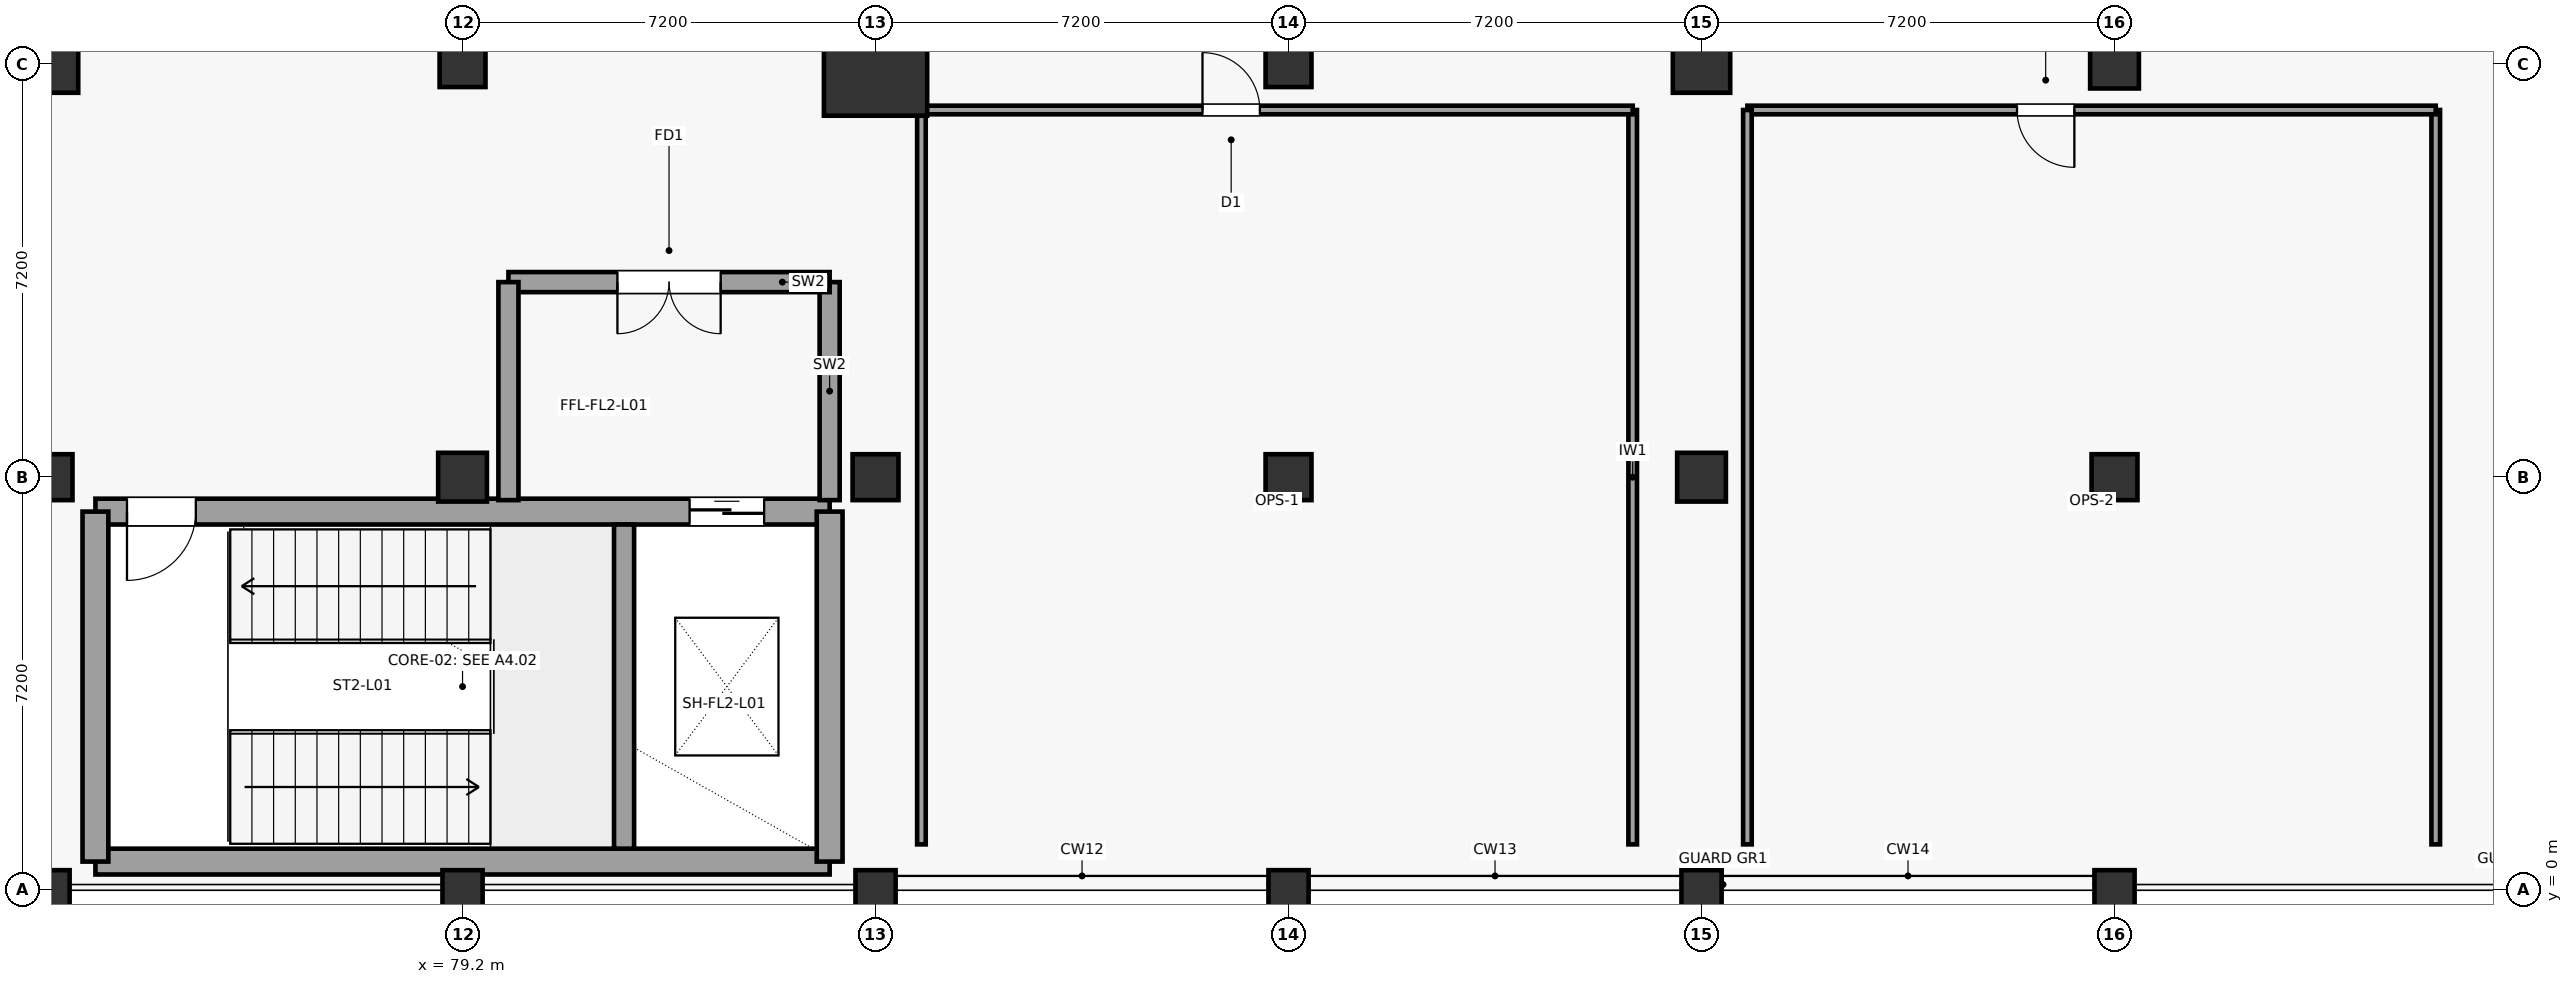
"""IFC4 building model, lengths in metres.
Left out: names, types, materials, properties, quantities, classifications, styles, units other than length and angle.
Written with IfcOpenShell. Run it as: python <this file> out.ifc"""

import sys

from ifc_helpers import new_model, si_unit, direction, frame, frame_2d, origin, origin_2d, place, context, subcontext, project, spatial, rectangle, circle, extrude, element, fill, save


model = new_model("IFC4")
c1 = context("Model", 3, precision=1e-05, world=origin(), true_north=direction((0.0, 1.0)))
c2 = subcontext(c1, "Body", "Model", "MODEL_VIEW")
j1 = project(units=[si_unit("LENGTHUNIT", "METRE"), si_unit("PLANEANGLEUNIT", "RADIAN")], contexts=[c1])
p1 = place(None, origin())
s1 = spatial("IfcSite", under=j1, at=p1, CompositionType="ELEMENT")
p2 = place(p1, origin())
s2 = spatial("IfcBuilding", under=s1, at=p2, CompositionType="ELEMENT")
p3 = place(p2, frame((0.0, 0.0, 5.4)))
s3 = spatial("IfcBuildingStorey", under=s2, at=p3, CompositionType="ELEMENT", Elevation=5.4)
p4 = place(p3, frame((72.0, 0.0, 0.0), z_axis=(0.0, 0.0, 1.0), x_axis=(1.0, 0.0, 0.0)))
e1 = element("IfcColumn", 1, at=p4, inside=s3, PredefinedType="COLUMN", context=c2, shape_type="SweptSolid", body=[
    extrude(rectangle(XDim=0.7, YDim=0.7, at=origin_2d()), origin(), (0.0, 0.0, 1.0), 4.2),
])
p5 = place(p3, frame((72.0, 7.2, 0.0), z_axis=(0.0, 0.0, 1.0), x_axis=(1.0, 0.0, 0.0)))
e2 = element("IfcColumn", 2, at=p5, inside=s3, PredefinedType="COLUMN", context=c2, shape_type="SweptSolid", body=[
    extrude(rectangle(XDim=0.8, YDim=0.8, at=origin_2d()), origin(), (0.0, 0.0, 1.0), 4.2),
])
p6 = place(p3, frame((72.0, 14.4, 0.0), z_axis=(0.0, 0.0, 1.0), x_axis=(1.0, 0.0, 0.0)))
e3 = element("IfcColumn", 3, at=p6, inside=s3, PredefinedType="COLUMN", context=c2, shape_type="SweptSolid", body=[
    extrude(circle(Radius=0.5, at=origin_2d()), origin(), (0.0, 0.0, 1.0), 4.2),
])
p7 = place(p3, frame((79.2, 0.0, 0.0), z_axis=(0.0, 0.0, 1.0), x_axis=(1.0, 0.0, 0.0)))
e4 = element("IfcColumn", 4, at=p7, inside=s3, PredefinedType="COLUMN", context=c2, shape_type="SweptSolid", body=[
    extrude(rectangle(XDim=0.7, YDim=0.7, at=origin_2d()), origin(), (0.0, 0.0, 1.0), 4.2),
])
p8 = place(p3, frame((79.2, 7.2, 0.0), z_axis=(0.0, 0.0, 1.0), x_axis=(1.0, 0.0, 0.0)))
e5 = element("IfcColumn", 5, at=p8, inside=s3, PredefinedType="COLUMN", context=c2, shape_type="SweptSolid", body=[
    extrude(rectangle(XDim=0.85, YDim=0.85, at=origin_2d()), origin(), (0.0, 0.0, 1.0), 4.2),
])
p9 = place(p3, frame((79.2, 14.4, 0.0), z_axis=(0.0, 0.0, 1.0), x_axis=(1.0, 0.0, 0.0)))
e6 = element("IfcColumn", 6, at=p9, inside=s3, PredefinedType="COLUMN", context=c2, shape_type="SweptSolid", body=[
    extrude(rectangle(XDim=0.8, YDim=0.8, at=origin_2d()), origin(), (0.0, 0.0, 1.0), 4.2),
])
p10 = place(p3, frame((86.4, 0.0, 0.0), z_axis=(0.0, 0.0, 1.0), x_axis=(1.0, 0.0, 0.0)))
e7 = element("IfcColumn", 7, at=p10, inside=s3, PredefinedType="COLUMN", context=c2, shape_type="SweptSolid", body=[
    extrude(rectangle(XDim=0.7, YDim=0.7, at=origin_2d()), origin(), (0.0, 0.0, 1.0), 4.2),
])
p11 = place(p3, frame((86.4, 7.2, 0.0), z_axis=(0.0, 0.0, 1.0), x_axis=(1.0, 0.0, 0.0)))
e8 = element("IfcColumn", 8, at=p11, inside=s3, PredefinedType="COLUMN", context=c2, shape_type="SweptSolid", body=[
    extrude(circle(Radius=0.4, at=origin_2d()), origin(), (0.0, 0.0, 1.0), 4.2),
])
p12 = place(p3, frame((86.4, 14.4, 0.0), z_axis=(0.0, 0.0, 1.0), x_axis=(1.0, 0.0, 0.0)))
e9 = element("IfcColumn", 9, at=p12, inside=s3, PredefinedType="COLUMN", context=c2, shape_type="SweptSolid", body=[
    extrude(circle(Radius=0.9, at=origin_2d()), origin(), (0.0, 0.0, 1.0), 4.2),
])
p13 = place(p3, frame((93.6, 0.0, 0.0), z_axis=(0.0, 0.0, 1.0), x_axis=(1.0, 0.0, 0.0)))
e10 = element("IfcColumn", 10, at=p13, inside=s3, PredefinedType="COLUMN", context=c2, shape_type="SweptSolid", body=[
    extrude(rectangle(XDim=0.7, YDim=0.7, at=origin_2d()), origin(), (0.0, 0.0, 1.0), 4.2),
])
p14 = place(p3, frame((93.6, 7.2, 0.0), z_axis=(0.0, 0.0, 1.0), x_axis=(1.0, 0.0, 0.0)))
e11 = element("IfcColumn", 11, at=p14, inside=s3, PredefinedType="COLUMN", context=c2, shape_type="SweptSolid", body=[
    extrude(rectangle(XDim=0.8, YDim=0.8, at=origin_2d()), origin(), (0.0, 0.0, 1.0), 4.2),
])
p15 = place(p3, frame((93.6, 14.4, 0.0), z_axis=(0.0, 0.0, 1.0), x_axis=(1.0, 0.0, 0.0)))
e12 = element("IfcColumn", 12, at=p15, inside=s3, PredefinedType="COLUMN", context=c2, shape_type="SweptSolid", body=[
    extrude(circle(Radius=0.4, at=origin_2d()), origin(), (0.0, 0.0, 1.0), 4.2),
])
p16 = place(p3, frame((100.8, 0.0, 0.0), z_axis=(0.0, 0.0, 1.0), x_axis=(1.0, 0.0, 0.0)))
e13 = element("IfcColumn", 13, at=p16, inside=s3, PredefinedType="COLUMN", context=c2, shape_type="SweptSolid", body=[
    extrude(rectangle(XDim=0.7, YDim=0.7, at=origin_2d()), origin(), (0.0, 0.0, 1.0), 4.2),
])
p17 = place(p3, frame((100.8, 7.2, 0.0), z_axis=(0.0, 0.0, 1.0), x_axis=(1.0, 0.0, 0.0)))
e14 = element("IfcColumn", 14, at=p17, inside=s3, PredefinedType="COLUMN", context=c2, shape_type="SweptSolid", body=[
    extrude(rectangle(XDim=0.85, YDim=0.85, at=origin_2d()), origin(), (0.0, 0.0, 1.0), 4.2),
])
p18 = place(p3, frame((100.8, 14.4, 0.0), z_axis=(0.0, 0.0, 1.0), x_axis=(1.0, 0.0, 0.0)))
e15 = element("IfcColumn", 15, at=p18, inside=s3, PredefinedType="COLUMN", context=c2, shape_type="SweptSolid", body=[
    extrude(circle(Radius=0.5, at=origin_2d()), origin(), (0.0, 0.0, 1.0), 4.2),
])
p19 = place(p3, frame((108.0, 0.0, 0.0), z_axis=(0.0, 0.0, 1.0), x_axis=(1.0, 0.0, 0.0)))
e16 = element("IfcColumn", 16, at=p19, inside=s3, PredefinedType="COLUMN", context=c2, shape_type="SweptSolid", body=[
    extrude(rectangle(XDim=0.7, YDim=0.7, at=origin_2d()), origin(), (0.0, 0.0, 1.0), 4.2),
])
p20 = place(p3, frame((108.0, 7.2, 0.0), z_axis=(0.0, 0.0, 1.0), x_axis=(1.0, 0.0, 0.0)))
e17 = element("IfcColumn", 17, at=p20, inside=s3, PredefinedType="COLUMN", context=c2, shape_type="SweptSolid", body=[
    extrude(circle(Radius=0.4, at=origin_2d()), origin(), (0.0, 0.0, 1.0), 4.2),
])
p21 = place(p3, frame((108.0, 14.4, 0.0), z_axis=(0.0, 0.0, 1.0), x_axis=(1.0, 0.0, 0.0)))
e18 = element("IfcColumn", 18, at=p21, inside=s3, PredefinedType="COLUMN", context=c2, shape_type="SweptSolid", body=[
    extrude(rectangle(XDim=0.85, YDim=0.85, at=origin_2d()), origin(), (0.0, 0.0, 1.0), 4.2),
])
p22 = place(p3, frame((72.8, 0.5, 0.0), z_axis=(0.0, 0.0, 1.0), x_axis=(1.0, 0.0, 0.0)))
e19 = element("IfcWall", 19, at=p22, inside=s3, PredefinedType="SHEAR", context=c2, shape_type="SweptSolid", body=[
    extrude(rectangle(XDim=12.8, YDim=0.45, at=frame_2d((6.4, 0.0))), origin(), (0.0, 0.0, 1.0), 3.92),
])
p23 = place(p3, frame((72.8, 6.6, 0.0), z_axis=(0.0, 0.0, 1.0), x_axis=(1.0, 0.0, 0.0)))
e20 = element("IfcWall", 20, at=p23, inside=s3, PredefinedType="SHEAR", context=c2, shape_type="SweptSolid", body=[
    extrude(rectangle(XDim=12.8, YDim=0.45, at=frame_2d((6.4, 0.0))), origin(), (0.0, 0.0, 1.0), 3.92),
])
p24 = place(p23, frame((0.55, 0.0, 0.0)))
e21 = element("IfcOpeningElement", 21, at=p24, cuts=e20, PredefinedType="OPENING", context=c2, shape_type="SweptSolid", body=[
    extrude(rectangle(XDim=1.2, YDim=2.25, at=frame_2d((0.6, 1.125))), frame((0.0, 0.235, 0.0), z_axis=(0.0, -1.0, 0.0), x_axis=(1.0, 0.0, 0.0)), (0.0, 0.0, 1.0), 0.47),
])
p25 = place(p23, frame((10.358, 0.0, 0.0)))
e22 = element("IfcOpeningElement", 22, at=p25, cuts=e20, PredefinedType="OPENING", context=c2, shape_type="SweptSolid", body=[
    extrude(rectangle(XDim=1.3, YDim=2.25, at=frame_2d((0.65, 1.125))), frame((0.0, 0.235, 0.0), z_axis=(0.0, -1.0, 0.0), x_axis=(1.0, 0.0, 0.0)), (0.0, 0.0, 1.0), 0.47),
])
for number, where, z_axis, x_axis in (
    (23, (72.8, 0.5, 0.0), (0.0, 0.0, 1.0), (0.0, 1.0, 0.0)),
    (24, (85.6, 0.5, 0.0), (0.0, 0.0, 1.0), (0.0, 1.0, 0.0)),
):
    element("IfcWall", number, at=place(p3, frame(where, z_axis=z_axis, x_axis=x_axis)), inside=s3, PredefinedType="SHEAR", context=c2, shape_type="SweptSolid", body=[
        extrude(rectangle(XDim=6.1, YDim=0.45, at=frame_2d((3.05, 0.0))), origin(), (0.0, 0.0, 1.0), 3.92),
    ])
p26 = place(p3, frame((82.016, 0.725, 0.0), z_axis=(0.0, 0.0, 1.0), x_axis=(0.0, 1.0, 0.0)))
e25 = element("IfcWall", 25, at=p26, inside=s3, PredefinedType="SHEAR", context=c2, shape_type="SweptSolid", body=[
    extrude(rectangle(XDim=5.65, YDim=0.35, at=frame_2d((2.825, 0.0))), origin(), (0.0, 0.0, 1.0), 3.92),
])
p27 = place(p3, frame((85.6, 6.8, 0.0), z_axis=(0.0, 0.0, 1.0), x_axis=(0.0, 1.0, 0.0)))
e26 = element("IfcWall", 26, at=p27, inside=s3, PredefinedType="SHEAR", context=c2, shape_type="SweptSolid", body=[
    extrude(rectangle(XDim=3.8, YDim=0.35, at=frame_2d((1.9, 0.0))), origin(), (0.0, 0.0, 1.0), 2.98),
])
p28 = place(p3, frame((85.6, 10.6, 0.0), z_axis=(0.0, 0.0, 1.0), x_axis=(-1.0, 0.0, 0.0)))
e27 = element("IfcWall", 27, at=p28, inside=s3, PredefinedType="SHEAR", context=c2, shape_type="SweptSolid", body=[
    extrude(rectangle(XDim=5.6, YDim=0.35, at=frame_2d((2.8, 0.0))), origin(), (0.0, 0.0, 1.0), 2.98),
])
p29 = place(p28, frame((1.9, 0.0, 0.0)))
e28 = element("IfcOpeningElement", 28, at=p29, cuts=e27, PredefinedType="OPENING", context=c2, shape_type="SweptSolid", body=[
    extrude(rectangle(XDim=1.8, YDim=2.3, at=frame_2d((0.9, 1.15))), frame((0.0, 0.185, 0.0), z_axis=(0.0, -1.0, 0.0), x_axis=(1.0, 0.0, 0.0)), (0.0, 0.0, 1.0), 0.37),
])
p30 = place(p3, frame((80.0, 10.6, 0.0), z_axis=(0.0, 0.0, 1.0), x_axis=(0.0, -1.0, 0.0)))
e29 = element("IfcWall", 29, at=p30, inside=s3, PredefinedType="SHEAR", context=c2, shape_type="SweptSolid", body=[
    extrude(rectangle(XDim=3.8, YDim=0.35, at=frame_2d((1.9, 0.0))), origin(), (0.0, 0.0, 1.0), 2.98),
])
p31 = place(p3, frame((99.6, 0.8, 0.0), z_axis=(0.0, 0.0, 1.0), x_axis=(0.0, 1.0, 0.0)))
e30 = element("IfcWall", 30, at=p31, inside=s3, PredefinedType="PARTITIONING", context=c2, shape_type="SweptSolid", body=[
    extrude(rectangle(XDim=12.8, YDim=0.15, at=frame_2d((6.4, 0.0))), origin(), (0.0, 0.0, 1.0), 2.98),
])
p32 = place(p3, frame((99.6, 13.6, 0.0), z_axis=(0.0, 0.0, 1.0), x_axis=(-1.0, 0.0, 0.0)))
e31 = element("IfcWall", 31, at=p32, inside=s3, PredefinedType="PARTITIONING", context=c2, shape_type="SweptSolid", body=[
    extrude(rectangle(XDim=12.4, YDim=0.15, at=frame_2d((6.2, 0.0))), origin(), (0.0, 0.0, 1.0), 2.98),
])
p33 = place(p32, frame((6.5, 0.0, 0.0)))
e32 = element("IfcOpeningElement", 32, at=p33, cuts=e31, PredefinedType="OPENING", context=c2, shape_type="SweptSolid", body=[
    extrude(rectangle(XDim=1.0, YDim=2.2, at=frame_2d((0.5, 1.1))), frame((0.0, 0.085, 0.0), z_axis=(0.0, -1.0, 0.0), x_axis=(1.0, 0.0, 0.0)), (0.0, 0.0, 1.0), 0.17),
])
for number, where, z_axis, x_axis in (
    (33, (87.2, 13.6, 0.0), (0.0, 0.0, 1.0), (0.0, -1.0, 0.0)),
    (34, (113.6, 0.8, 0.0), (0.0, 0.0, 1.0), (0.0, 1.0, 0.0)),
):
    element("IfcWall", number, at=place(p3, frame(where, z_axis=z_axis, x_axis=x_axis)), inside=s3, PredefinedType="PARTITIONING", context=c2, shape_type="SweptSolid", body=[
        extrude(rectangle(XDim=12.8, YDim=0.15, at=frame_2d((6.4, 0.0))), origin(), (0.0, 0.0, 1.0), 2.98),
    ])
p34 = place(p3, frame((113.6, 13.6, 0.0), z_axis=(0.0, 0.0, 1.0), x_axis=(-1.0, 0.0, 0.0)))
e35 = element("IfcWall", 35, at=p34, inside=s3, PredefinedType="PARTITIONING", context=c2, shape_type="SweptSolid", body=[
    extrude(rectangle(XDim=12.0, YDim=0.15, at=frame_2d((6.0, 0.0))), origin(), (0.0, 0.0, 1.0), 2.98),
])
p35 = place(p34, frame((6.3, 0.0, 0.0)))
e36 = element("IfcOpeningElement", 36, at=p35, cuts=e35, PredefinedType="OPENING", context=c2, shape_type="SweptSolid", body=[
    extrude(rectangle(XDim=1.0, YDim=2.2, at=frame_2d((0.5, 1.1))), frame((0.0, 0.085, 0.0), z_axis=(0.0, -1.0, 0.0), x_axis=(1.0, 0.0, 0.0)), (0.0, 0.0, 1.0), 0.17),
])
p36 = place(p3, frame((101.6, 13.6, 0.0), z_axis=(0.0, 0.0, 1.0), x_axis=(0.0, -1.0, 0.0)))
e37 = element("IfcWall", 37, at=p36, inside=s3, PredefinedType="PARTITIONING", context=c2, shape_type="SweptSolid", body=[
    extrude(rectangle(XDim=12.8, YDim=0.15, at=frame_2d((6.4, 0.0))), origin(), (0.0, 0.0, 1.0), 2.98),
])
p37 = place(p24, frame((1.2, 0.0, 0.0), z_axis=(0.0, 0.0, 1.0), x_axis=(-1.0, 0.0, 0.0)))
e38 = element("IfcDoor", 38, at=p37, inside=s3, OperationType="SINGLE_SWING_LEFT", PredefinedType="DOOR", context=c2, shape_type="SweptSolid", body=[
    extrude(rectangle(XDim=1.2, YDim=2.25, at=frame_2d((0.6, 1.125))), frame((0.0, 0.025, 0.0), z_axis=(0.0, -1.0, 0.0), x_axis=(1.0, 0.0, 0.0)), (0.0, 0.0, 1.0), 0.05),
])
fill(e21, e38)
p38 = place(p25, origin())
e39 = element("IfcDoor", 39, at=p38, inside=s3, OperationType="SLIDING_TO_LEFT", PredefinedType="DOOR", context=c2, shape_type="SweptSolid", body=[
    extrude(rectangle(XDim=1.3, YDim=2.25, at=frame_2d((0.65, 1.125))), frame((0.0, 0.025, 0.0), z_axis=(0.0, -1.0, 0.0), x_axis=(1.0, 0.0, 0.0)), (0.0, 0.0, 1.0), 0.05),
])
fill(e22, e39)
p39 = place(p29, origin())
e40 = element("IfcDoor", 40, at=p39, inside=s3, OperationType="DOUBLE_DOOR_SINGLE_SWING", PredefinedType="DOOR", context=c2, shape_type="SweptSolid", body=[
    extrude(rectangle(XDim=1.8, YDim=2.3, at=frame_2d((0.9, 1.15))), frame((0.0, 0.025, 0.0), z_axis=(0.0, -1.0, 0.0), x_axis=(1.0, 0.0, 0.0)), (0.0, 0.0, 1.0), 0.05),
])
fill(e28, e40)
p40 = place(p33, frame((1.0, 0.0, 0.0), z_axis=(0.0, 0.0, 1.0), x_axis=(-1.0, 0.0, 0.0)))
e41 = element("IfcDoor", 41, at=p40, inside=s3, OperationType="SINGLE_SWING_RIGHT", PredefinedType="DOOR", context=c2, shape_type="SweptSolid", body=[
    extrude(rectangle(XDim=1.0, YDim=2.2, at=frame_2d((0.5, 1.1))), frame((0.0, 0.025, 0.0), z_axis=(0.0, -1.0, 0.0), x_axis=(1.0, 0.0, 0.0)), (0.0, 0.0, 1.0), 0.05),
])
fill(e32, e41)
p41 = place(p35, origin())
e42 = element("IfcDoor", 42, at=p41, inside=s3, OperationType="SINGLE_SWING_LEFT", PredefinedType="DOOR", context=c2, shape_type="SweptSolid", body=[
    extrude(rectangle(XDim=1.0, YDim=2.2, at=frame_2d((0.5, 1.1))), frame((0.0, 0.025, 0.0), z_axis=(0.0, -1.0, 0.0), x_axis=(1.0, 0.0, 0.0)), (0.0, 0.0, 1.0), 0.05),
])
fill(e36, e42)
save(model, sys.argv[1])
